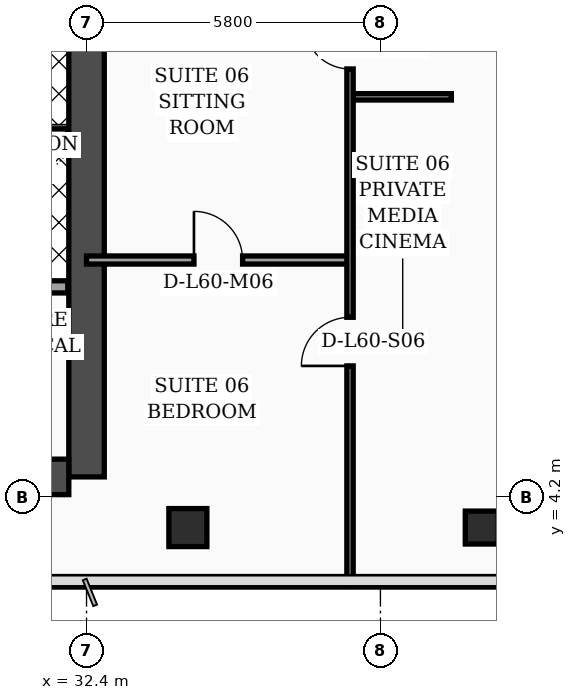
"""IFC4 building model, lengths in metres.
Left out: names, types, materials, properties, quantities, classifications, styles, units other than length and angle.
Written with IfcOpenShell. Run it as: python <this file> out.ifc"""

import sys

from ifc_helpers import new_model, si_unit, direction, frame, frame_2d, origin, origin_2d, place, context, subcontext, project, spatial, rectangle, hollow_rectangle, extrude, element, fill, save


model = new_model("IFC4")
c1 = context("Model", 3, precision=1e-05, world=origin(), true_north=direction((0.0, 1.0)))
c2 = subcontext(c1, "Body", "Model", "MODEL_VIEW")
j1 = project(units=[si_unit("LENGTHUNIT", "METRE"), si_unit("PLANEANGLEUNIT", "RADIAN")], contexts=[c1])
p1 = place(None, origin())
s1 = spatial("IfcSite", under=j1, at=p1, CompositionType="ELEMENT")
p2 = place(p1, origin())
s2 = spatial("IfcBuilding", under=s1, at=p2, CompositionType="ELEMENT")
p3 = place(p2, frame((0.0, 0.0, 243.8)))
s3 = spatial("IfcBuildingStorey", under=s2, at=p3, CompositionType="ELEMENT", Elevation=243.8)
p4 = place(p3, frame((32.4, 4.6, 0.0), z_axis=(0.0, 0.0, 1.0), x_axis=(0.0, 1.0, 0.0)))
e1 = element("IfcWall", 1, at=p4, inside=s3, PredefinedType="SHEAR", context=c2, shape_type="SweptSolid", body=[
    extrude(rectangle(XDim=10.4, YDim=0.7, at=frame_2d((5.2, 0.0))), origin(), (0.0, 0.0, 1.0), 3.56),
])
p5 = place(p3, frame((21.95, 4.6, 0.0), z_axis=(0.0, 0.0, 1.0), x_axis=(1.0, 0.0, 0.0)))
e2 = element("IfcWall", 2, at=p5, inside=s3, PredefinedType="SHEAR", context=c2, shape_type="SweptSolid", body=[
    extrude(rectangle(XDim=10.1, YDim=0.7, at=frame_2d((5.05, 0.0))), origin(), (0.0, 0.0, 1.0), 3.56),
])
p6 = place(p3, frame((34.4, 3.6, 0.0), z_axis=(0.0, 0.0, 1.0), x_axis=(1.0, 0.0, 0.0)))
e3 = element("IfcColumn", 3, at=p6, inside=s3, PredefinedType="COLUMN", context=c2, shape_type="SweptSolid", body=[
    extrude(hollow_rectangle(XDim=0.75, YDim=0.75, WallThickness=0.032, at=origin_2d()), origin(), (0.0, 0.0, 1.0), 3.56),
])
p7 = place(p3, frame((40.2, 3.6, 0.0), z_axis=(0.0, 0.0, 1.0), x_axis=(1.0, 0.0, 0.0)))
e4 = element("IfcColumn", 4, at=p7, inside=s3, PredefinedType="COLUMN", context=c2, shape_type="SweptSolid", body=[
    extrude(hollow_rectangle(XDim=0.65, YDim=0.65, WallThickness=0.028, at=origin_2d()), origin(), (0.0, 0.0, 1.0), 3.56),
])
p8 = place(p3, frame((46.63, 5.505, 0.0), z_axis=(0.0, 0.0, 1.0), x_axis=(-0.300501856448, 0.953781229775, 0.0)))
e5 = element("IfcWall", 5, at=p8, inside=s3, PredefinedType="SOLIDWALL", context=c2, shape_type="SweptSolid", body=[
    extrude(rectangle(XDim=30.814, YDim=0.32, at=frame_2d((15.407, 0.0))), origin(), (0.0, 0.0, 1.0), 3.56),
])
p9 = place(p8, frame((8.9, 0.0, 0.0)))
e6 = element("IfcOpeningElement", 6, at=p9, cuts=e5, PredefinedType="OPENING", context=c2, shape_type="SweptSolid", body=[
    extrude(rectangle(XDim=1.4, YDim=2.25, at=frame_2d((0.7, 1.125))), frame((0.0, 0.17, 0.0), z_axis=(0.0, -1.0, 0.0), x_axis=(1.0, 0.0, 0.0)), (0.0, 0.0, 1.0), 0.34),
])
p10 = place(p8, frame((4.437, 0.0, 0.7)))
e7 = element("IfcOpeningElement", 7, at=p10, cuts=e5, PredefinedType="OPENING", context=c2, shape_type="SweptSolid", body=[
    extrude(rectangle(XDim=1.6, YDim=1.65, at=frame_2d((0.8, 0.825))), frame((0.0, 0.17, 0.0), z_axis=(0.0, -1.0, 0.0), x_axis=(1.0, 0.0, 0.0)), (0.0, 0.0, 1.0), 0.34),
])
p11 = place(p8, frame((18.696, 0.0, 0.7)))
e8 = element("IfcOpeningElement", 8, at=p11, cuts=e5, PredefinedType="OPENING", context=c2, shape_type="SweptSolid", body=[
    extrude(rectangle(XDim=1.6, YDim=1.65, at=frame_2d((0.8, 0.825))), frame((0.0, 0.17, 0.0), z_axis=(0.0, -1.0, 0.0), x_axis=(1.0, 0.0, 0.0)), (0.0, 0.0, 1.0), 0.34),
])
p12 = place(p8, frame((1.6, 0.0, 0.75)))
e9 = element("IfcOpeningElement", 9, at=p12, cuts=e5, PredefinedType="OPENING", context=c2, shape_type="SweptSolid", body=[
    extrude(rectangle(XDim=1.5, YDim=1.6, at=frame_2d((0.75, 0.8))), frame((0.0, 0.17, 0.0), z_axis=(0.0, -1.0, 0.0), x_axis=(1.0, 0.0, 0.0)), (0.0, 0.0, 1.0), 0.34),
])
p13 = place(p8, frame((6.75, 0.0, 0.75)))
e10 = element("IfcOpeningElement", 10, at=p13, cuts=e5, PredefinedType="OPENING", context=c2, shape_type="SweptSolid", body=[
    extrude(rectangle(XDim=1.5, YDim=1.6, at=frame_2d((0.75, 0.8))), frame((0.0, 0.17, 0.0), z_axis=(0.0, -1.0, 0.0), x_axis=(1.0, 0.0, 0.0)), (0.0, 0.0, 1.0), 0.34),
])
p14 = place(p8, frame((10.9, 0.0, 0.75)))
e11 = element("IfcOpeningElement", 11, at=p14, cuts=e5, PredefinedType="OPENING", context=c2, shape_type="SweptSolid", body=[
    extrude(rectangle(XDim=1.5, YDim=1.6, at=frame_2d((0.75, 0.8))), frame((0.0, 0.17, 0.0), z_axis=(0.0, -1.0, 0.0), x_axis=(1.0, 0.0, 0.0)), (0.0, 0.0, 1.0), 0.34),
])
p15 = place(p8, frame((14.0, 0.0, 0.75)))
e12 = element("IfcOpeningElement", 12, at=p15, cuts=e5, PredefinedType="OPENING", context=c2, shape_type="SweptSolid", body=[
    extrude(rectangle(XDim=1.5, YDim=1.6, at=frame_2d((0.75, 0.8))), frame((0.0, 0.17, 0.0), z_axis=(0.0, -1.0, 0.0), x_axis=(1.0, 0.0, 0.0)), (0.0, 0.0, 1.0), 0.34),
])
p16 = place(p8, frame((16.55, 0.0, 0.75)))
e13 = element("IfcOpeningElement", 13, at=p16, cuts=e5, PredefinedType="OPENING", context=c2, shape_type="SweptSolid", body=[
    extrude(rectangle(XDim=1.5, YDim=1.6, at=frame_2d((0.75, 0.8))), frame((0.0, 0.17, 0.0), z_axis=(0.0, -1.0, 0.0), x_axis=(1.0, 0.0, 0.0)), (0.0, 0.0, 1.0), 0.34),
])
p17 = place(p8, frame((20.75, 0.0, 0.75)))
e14 = element("IfcOpeningElement", 14, at=p17, cuts=e5, PredefinedType="OPENING", context=c2, shape_type="SweptSolid", body=[
    extrude(rectangle(XDim=1.5, YDim=1.6, at=frame_2d((0.75, 0.8))), frame((0.0, 0.17, 0.0), z_axis=(0.0, -1.0, 0.0), x_axis=(1.0, 0.0, 0.0)), (0.0, 0.0, 1.0), 0.34),
])
p18 = place(p8, frame((23.3, 0.0, 0.75)))
e15 = element("IfcOpeningElement", 15, at=p18, cuts=e5, PredefinedType="OPENING", context=c2, shape_type="SweptSolid", body=[
    extrude(rectangle(XDim=1.5, YDim=1.6, at=frame_2d((0.75, 0.8))), frame((0.0, 0.17, 0.0), z_axis=(0.0, -1.0, 0.0), x_axis=(1.0, 0.0, 0.0)), (0.0, 0.0, 1.0), 0.34),
])
p19 = place(p8, frame((26.4, 0.0, 0.75)))
e16 = element("IfcOpeningElement", 16, at=p19, cuts=e5, PredefinedType="OPENING", context=c2, shape_type="SweptSolid", body=[
    extrude(rectangle(XDim=1.5, YDim=1.6, at=frame_2d((0.75, 0.8))), frame((0.0, 0.17, 0.0), z_axis=(0.0, -1.0, 0.0), x_axis=(1.0, 0.0, 0.0)), (0.0, 0.0, 1.0), 0.34),
])
p20 = place(p3, frame((27.02, 11.35, 0.0), z_axis=(0.0, 0.0, 1.0), x_axis=(1.0, 0.0, 0.0)))
e17 = element("IfcWall", 17, at=p20, inside=s3, PredefinedType="SOLIDWALL", context=c2, shape_type="SweptSolid", body=[
    extrude(rectangle(XDim=5.01, YDim=0.24, at=frame_2d((2.505, 0.0))), origin(), (0.0, 0.0, 1.0), 3.56),
])
p21 = place(p20, frame((0.45, 0.0, 0.0)))
e18 = element("IfcOpeningElement", 18, at=p21, cuts=e17, PredefinedType="OPENING", context=c2, shape_type="SweptSolid", body=[
    extrude(rectangle(XDim=1.3, YDim=2.35, at=frame_2d((0.65, 1.175))), frame((0.0, 0.13, 0.0), z_axis=(0.0, -1.0, 0.0), x_axis=(1.0, 0.0, 0.0)), (0.0, 0.0, 1.0), 0.26),
])
p22 = place(p3, frame((27.02, 8.35, 0.0), z_axis=(0.0, 0.0, 1.0), x_axis=(1.0, 0.0, 0.0)))
e19 = element("IfcWall", 19, at=p22, inside=s3, PredefinedType="SOLIDWALL", context=c2, shape_type="SweptSolid", body=[
    extrude(rectangle(XDim=5.01, YDim=0.24, at=frame_2d((2.505, 0.0))), origin(), (0.0, 0.0, 1.0), 3.56),
])
p23 = place(p3, frame((37.6, 12.1, 0.0), z_axis=(0.0, 0.0, 1.0), x_axis=(1.0, 0.0, 0.0)))
e20 = element("IfcWall", 20, at=p23, inside=s3, PredefinedType="PARTITIONING", context=c2, shape_type="SweptSolid", body=[
    extrude(rectangle(XDim=2.0, YDim=0.125, at=frame_2d((1.0, 0.0))), origin(), (0.0, 0.0, 1.0), 3.56),
])
p24 = place(p3, frame((32.4, 8.88, 0.0), z_axis=(0.0, 0.0, 1.0), x_axis=(1.0, 0.0, 0.0)))
e21 = element("IfcWall", 21, at=p24, inside=s3, PredefinedType="PARTITIONING", context=c2, shape_type="SweptSolid", body=[
    extrude(rectangle(XDim=5.2, YDim=0.16, at=frame_2d((2.6, 0.0))), origin(), (0.0, 0.0, 1.0), 2.99),
])
p25 = place(p24, frame((2.12, 0.0, 0.0)))
e22 = element("IfcOpeningElement", 22, at=p25, cuts=e21, PredefinedType="OPENING", context=c2, shape_type="SweptSolid", body=[
    extrude(rectangle(XDim=0.96, YDim=2.2, at=frame_2d((0.48, 1.1))), frame((0.0, 0.09, 0.0), z_axis=(0.0, -1.0, 0.0), x_axis=(1.0, 0.0, 0.0)), (0.0, 0.0, 1.0), 0.18),
])
p26 = place(p3, frame((37.6, 2.44, 0.0), z_axis=(0.0, 0.0, 1.0), x_axis=(0.0, 1.0, 0.0)))
e23 = element("IfcWall", 23, at=p26, inside=s3, PredefinedType="PARTITIONING", context=c2, shape_type="SweptSolid", body=[
    extrude(rectangle(XDim=12.71, YDim=0.125, at=frame_2d((6.355, 0.0))), origin(), (0.0, 0.0, 1.0), 2.99),
])
p27 = place(p26, frame((4.35, 0.0, 0.0)))
e24 = element("IfcOpeningElement", 24, at=p27, cuts=e23, PredefinedType="OPENING", context=c2, shape_type="SweptSolid", body=[
    extrude(rectangle(XDim=0.96, YDim=2.2, at=frame_2d((0.48, 1.1))), frame((0.0, 0.073, 0.0), z_axis=(0.0, -1.0, 0.0), x_axis=(1.0, 0.0, 0.0)), (0.0, 0.0, 1.0), 0.145),
])
p28 = place(p26, frame((10.21, 0.0, 0.0)))
e25 = element("IfcOpeningElement", 25, at=p28, cuts=e23, PredefinedType="OPENING", context=c2, shape_type="SweptSolid", body=[
    extrude(rectangle(XDim=0.9, YDim=2.15, at=frame_2d((0.45, 1.075))), frame((0.0, 0.073, 0.0), z_axis=(0.0, -1.0, 0.0), x_axis=(1.0, 0.0, 0.0)), (0.0, 0.0, 1.0), 0.145),
])
p29 = place(p25, origin())
e26 = element("IfcDoor", 26, at=p29, inside=s3, OperationType="SINGLE_SWING_LEFT", PredefinedType="DOOR", context=c2, shape_type="SweptSolid", body=[
    extrude(rectangle(XDim=0.96, YDim=2.2, at=frame_2d((0.48, 1.1))), frame((0.0, 0.025, 0.0), z_axis=(0.0, -1.0, 0.0), x_axis=(1.0, 0.0, 0.0)), (0.0, 0.0, 1.0), 0.05),
])
fill(e22, e26)
p30 = place(p27, origin())
e27 = element("IfcDoor", 27, at=p30, inside=s3, OperationType="SINGLE_SWING_LEFT", PredefinedType="DOOR", context=c2, shape_type="SweptSolid", body=[
    extrude(rectangle(XDim=0.96, YDim=2.2, at=frame_2d((0.48, 1.1))), frame((0.0, 0.025, 0.0), z_axis=(0.0, -1.0, 0.0), x_axis=(1.0, 0.0, 0.0)), (0.0, 0.0, 1.0), 0.05),
])
fill(e24, e27)
p31 = place(p28, origin())
e28 = element("IfcDoor", 28, at=p31, inside=s3, OperationType="SINGLE_SWING_RIGHT", PredefinedType="DOOR", context=c2, shape_type="SweptSolid", body=[
    extrude(rectangle(XDim=0.9, YDim=2.15, at=frame_2d((0.45, 1.075))), frame((0.0, 0.025, 0.0), z_axis=(0.0, -1.0, 0.0), x_axis=(1.0, 0.0, 0.0)), (0.0, 0.0, 1.0), 0.05),
])
fill(e25, e28)
save(model, sys.argv[1])
